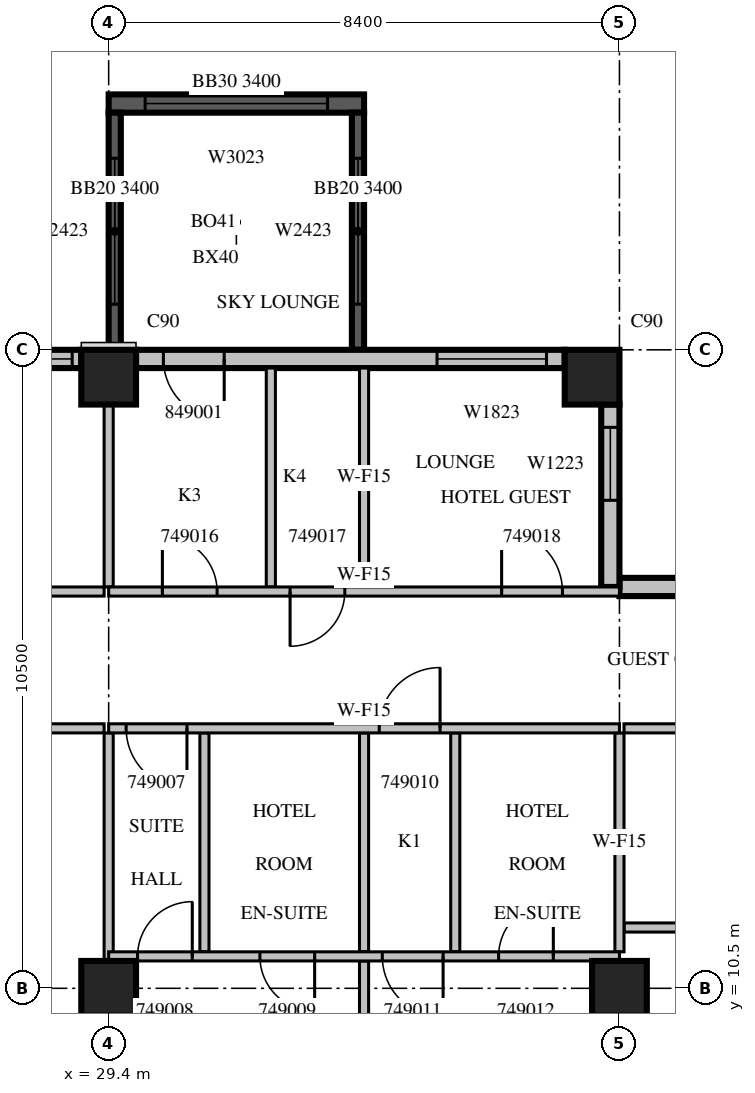
"""IFC4 building model, lengths in metres.
Left out: names, types, materials, properties, quantities, classifications, styles, units other than length and angle.
Written with IfcOpenShell. Run it as: python <this file> out.ifc"""

import sys

from ifc_helpers import new_model, si_unit, direction, frame, frame_2d, origin, origin_2d, place, context, subcontext, project, spatial, rectangle, extrude, source, transform, mapped, element, fill, save


model = new_model("IFC4")
c1 = context("Model", 3, precision=1e-05, world=origin(), true_north=direction((0.0, 1.0)))
c2 = subcontext(c1, "Body", "Model", "MODEL_VIEW")
j1 = project(units=[si_unit("LENGTHUNIT", "METRE"), si_unit("PLANEANGLEUNIT", "RADIAN")], contexts=[c1])
p1 = place(None, origin())
s1 = spatial("IfcSite", under=j1, at=p1, CompositionType="ELEMENT")
p2 = place(p1, origin())
s2 = spatial("IfcBuilding", under=s1, at=p2, CompositionType="ELEMENT")
p3 = place(p2, frame((0.0, 0.0, 219.6)))
s3 = spatial("IfcBuildingStorey", under=s2, at=p3, CompositionType="ELEMENT", Elevation=219.6)
m1 = source(origin(), c2, "Body", "SweptSolid", [
    extrude(rectangle(XDim=0.9, YDim=0.9, at=origin_2d()), origin(), (0.0, 0.0, 1.0), 3.8),
])
for number, where, z_axis, x_axis in (
    (1, (29.4, 10.5, 0.0), (0.0, 0.0, 1.0), (1.0, 0.0, 0.0)),
    (2, (37.8, 10.5, 0.0), (0.0, 0.0, 1.0), (1.0, 0.0, 0.0)),
    (3, (29.4, 20.55, 0.0), (0.0, 0.0, 1.0), (1.0, 0.0, 0.0)),
    (4, (37.35, 20.55, 0.0), (0.0, 0.0, 1.0), (1.0, 0.0, 0.0)),
):
    element("IfcColumn", number, at=place(p3, frame(where, z_axis=z_axis, x_axis=x_axis)), inside=s3, PredefinedType="COLUMN", context=c2, shape_type="MappedRepresentation", body=[
        mapped(m1, transform((0.0, 0.0, 0.0), scale=1.0)),
    ])
m2 = source(origin(), c2, "Body", "SweptSolid", [
    extrude(rectangle(XDim=4.2, YDim=0.3, at=frame_2d((2.1, 0.0))), origin(), (0.0, 0.0, 1.0), 3.4),
])
p4 = place(p3, frame((33.6, 25.05, 0.0), z_axis=(0.0, 0.0, 1.0), x_axis=(-1.0, 0.0, 0.0)))
e5 = element("IfcWall", 5, at=p4, inside=s3, PredefinedType="SOLIDWALL", context=c2, shape_type="MappedRepresentation", body=[
    mapped(m2, transform((0.0, 0.0, 0.0), scale=1.0)),
])
m3 = source(origin(), c2, "Body", "SweptSolid", [
    extrude(rectangle(XDim=3.0, YDim=2.3, at=frame_2d((1.5, 1.15))), frame((0.0, 0.16, 0.0), z_axis=(0.0, -1.0, 0.0), x_axis=(1.0, 0.0, 0.0)), (0.0, 0.0, 1.0), 0.32),
])
p5 = place(p4, frame((0.6, 0.0, 0.6)))
e6 = element("IfcOpeningElement", 6, at=p5, cuts=e5, PredefinedType="OPENING", context=c2, shape_type="MappedRepresentation", body=[
    mapped(m3, transform((0.0, 0.0, 0.0), scale=1.0)),
])
m4 = source(origin(), c2, "Body", "SweptSolid", [
    extrude(rectangle(XDim=3.9, YDim=0.2, at=frame_2d((1.95, 0.0))), origin(), (0.0, 0.0, 1.0), 3.4),
])
p6 = place(p3, frame((33.5, 21.0, 0.0), z_axis=(0.0, 0.0, 1.0), x_axis=(0.0, 1.0, 0.0)))
e7 = element("IfcWall", 7, at=p6, inside=s3, PredefinedType="SOLIDWALL", context=c2, shape_type="MappedRepresentation", body=[
    mapped(m4, transform((0.0, 0.0, 0.0), scale=1.0)),
])
m5 = source(origin(), c2, "Body", "SweptSolid", [
    extrude(rectangle(XDim=2.4, YDim=2.3, at=frame_2d((1.2, 1.15))), frame((0.0, 0.11, 0.0), z_axis=(0.0, -1.0, 0.0), x_axis=(1.0, 0.0, 0.0)), (0.0, 0.0, 1.0), 0.22),
])
p7 = place(p6, frame((0.75, 0.0, 0.6)))
e8 = element("IfcOpeningElement", 8, at=p7, cuts=e7, PredefinedType="OPENING", context=c2, shape_type="MappedRepresentation", body=[
    mapped(m5, transform((0.0, 0.0, 0.0), scale=1.0)),
])
p8 = place(p3, frame((29.5, 21.0, 0.0), z_axis=(0.0, 0.0, 1.0), x_axis=(0.0, 1.0, 0.0)))
e9 = element("IfcWall", 9, at=p8, inside=s3, PredefinedType="SOLIDWALL", context=c2, shape_type="MappedRepresentation", body=[
    mapped(m4, transform((0.0, 0.0, 0.0), scale=1.0)),
])
p9 = place(p8, frame((0.75, 0.0, 0.6)))
e10 = element("IfcOpeningElement", 10, at=p9, cuts=e9, PredefinedType="OPENING", context=c2, shape_type="MappedRepresentation", body=[
    mapped(m5, transform((0.0, 0.0, 0.0), scale=1.0)),
])
m6 = source(origin(), c2, "Body", "SweptSolid", [
    extrude(rectangle(XDim=15.96, YDim=0.3, at=frame_2d((7.98, 0.0))), origin(), (0.0, 0.0, 1.0), 3.4),
])
p10 = place(p3, frame((53.76, 17.1, 0.0), z_axis=(0.0, 0.0, 1.0), x_axis=(-1.0, 0.0, 0.0)))
e11 = element("IfcWall", 11, at=p10, inside=s3, PredefinedType="STANDARD", context=c2, shape_type="MappedRepresentation", body=[
    mapped(m6, transform((0.0, 0.0, 0.0), scale=1.0)),
])
p11 = place(p10, frame((0.6, 0.0, 0.6)))
e12 = element("IfcOpeningElement", 12, at=p11, cuts=e11, PredefinedType="OPENING", context=c2, shape_type="MappedRepresentation", body=[
    mapped(m3, transform((0.0, 0.0, 0.0), scale=1.0)),
])
p12 = place(p10, frame((4.8, 0.0, 0.6)))
e13 = element("IfcOpeningElement", 13, at=p12, cuts=e11, PredefinedType="OPENING", context=c2, shape_type="MappedRepresentation", body=[
    mapped(m3, transform((0.0, 0.0, 0.0), scale=1.0)),
])
m7 = source(origin(), c2, "Body", "SweptSolid", [
    extrude(rectangle(XDim=3.6, YDim=2.3, at=frame_2d((1.8, 1.15))), frame((0.0, 0.16, 0.0), z_axis=(0.0, -1.0, 0.0), x_axis=(1.0, 0.0, 0.0)), (0.0, 0.0, 1.0), 0.32),
])
p13 = place(p10, frame((9.54, 0.0, 0.6)))
e14 = element("IfcOpeningElement", 14, at=p13, cuts=e11, PredefinedType="OPENING", context=c2, shape_type="MappedRepresentation", body=[
    mapped(m7, transform((0.0, 0.0, 0.0), scale=1.0)),
])
m8 = source(origin(), c2, "Body", "SweptSolid", [
    extrude(rectangle(XDim=3.0, YDim=0.3, at=frame_2d((1.5, 0.0))), origin(), (0.0, 0.0, 1.0), 3.4),
])
p14 = place(p3, frame((37.65, 17.1, 0.0), z_axis=(0.0, 0.0, 1.0), x_axis=(0.0, 1.0, 0.0)))
e15 = element("IfcWall", 15, at=p14, inside=s3, PredefinedType="STANDARD", context=c2, shape_type="MappedRepresentation", body=[
    mapped(m8, transform((0.0, 0.0, 0.0), scale=1.0)),
])
m9 = source(origin(), c2, "Body", "SweptSolid", [
    extrude(rectangle(XDim=1.2, YDim=2.3, at=frame_2d((0.6, 1.15))), frame((0.0, 0.16, 0.0), z_axis=(0.0, -1.0, 0.0), x_axis=(1.0, 0.0, 0.0)), (0.0, 0.0, 1.0), 0.32),
])
p15 = place(p14, frame((1.425, 0.0, 0.6)))
e16 = element("IfcOpeningElement", 16, at=p15, cuts=e15, PredefinedType="OPENING", context=c2, shape_type="MappedRepresentation", body=[
    mapped(m9, transform((0.0, 0.0, 0.0), scale=1.0)),
])
m10 = source(origin(), c2, "Body", "SweptSolid", [
    extrude(rectangle(XDim=7.05, YDim=0.3, at=frame_2d((3.525, 0.0))), origin(), (0.0, 0.0, 1.0), 3.4),
])
p16 = place(p3, frame((36.9, 20.85, 0.0), z_axis=(0.0, 0.0, 1.0), x_axis=(-1.0, 0.0, 0.0)))
e17 = element("IfcWall", 17, at=p16, inside=s3, PredefinedType="STANDARD", context=c2, shape_type="MappedRepresentation", body=[
    mapped(m10, transform((0.0, 0.0, 0.0), scale=1.0)),
])
m11 = source(origin(), c2, "Body", "SweptSolid", [
    extrude(rectangle(XDim=1.8, YDim=2.3, at=frame_2d((0.9, 1.15))), frame((0.0, 0.16, 0.0), z_axis=(0.0, -1.0, 0.0), x_axis=(1.0, 0.0, 0.0)), (0.0, 0.0, 1.0), 0.32),
])
p17 = place(p16, frame((0.3, 0.0, 0.6)))
e18 = element("IfcOpeningElement", 18, at=p17, cuts=e17, PredefinedType="OPENING", context=c2, shape_type="MappedRepresentation", body=[
    mapped(m11, transform((0.0, 0.0, 0.0), scale=1.0)),
])
m12 = source(origin(), c2, "Body", "SweptSolid", [
    extrude(rectangle(XDim=1.0, YDim=2.1, at=frame_2d((0.5, 1.05))), frame((0.0, 0.16, 0.0), z_axis=(0.0, -1.0, 0.0), x_axis=(1.0, 0.0, 0.0)), (0.0, 0.0, 1.0), 0.32),
])
p18 = place(p16, frame((5.6, 0.0, 0.0)))
e19 = element("IfcOpeningElement", 19, at=p18, cuts=e17, PredefinedType="OPENING", context=c2, shape_type="MappedRepresentation", body=[
    mapped(m12, transform((0.0, 0.0, 0.0), scale=1.0)),
])
m13 = source(origin(), c2, "Body", "SweptSolid", [
    extrude(rectangle(XDim=7.15, YDim=0.3, at=frame_2d((3.575, 0.0))), origin(), (0.0, 0.0, 1.0), 3.4),
])
p19 = place(p3, frame((28.95, 20.85, 0.0), z_axis=(0.0, 0.0, 1.0), x_axis=(-1.0, 0.0, 0.0)))
e20 = element("IfcWall", 20, at=p19, inside=s3, PredefinedType="STANDARD", context=c2, shape_type="MappedRepresentation", body=[
    mapped(m13, transform((0.0, 0.0, 0.0), scale=1.0)),
])
p20 = place(p19, frame((0.15, 0.0, 0.6)))
e21 = element("IfcOpeningElement", 21, at=p20, cuts=e20, PredefinedType="OPENING", context=c2, shape_type="MappedRepresentation", body=[
    mapped(m3, transform((0.0, 0.0, 0.0), scale=1.0)),
])
p21 = place(p19, frame((4.95, 0.0, 0.6)))
e22 = element("IfcOpeningElement", 22, at=p21, cuts=e20, PredefinedType="OPENING", context=c2, shape_type="MappedRepresentation", body=[
    mapped(m11, transform((0.0, 0.0, 0.0), scale=1.0)),
])
m14 = source(origin(), c2, "Body", "SweptSolid", [
    extrude(rectangle(XDim=4.85, YDim=0.15, at=frame_2d((2.425, 0.0))), origin(), (0.0, 0.0, 1.0), 3.4),
])
for number, where, z_axis, x_axis in (
    (23, (29.325, 14.775, 0.0), (0.0, 0.0, 1.0), (-1.0, 0.0, 0.0)),
    (24, (24.475, 17.025, 0.0), (0.0, 0.0, 1.0), (1.0, 0.0, 0.0)),
):
    element("IfcWall", number, at=place(p3, frame(where, z_axis=z_axis, x_axis=x_axis)), inside=s3, PredefinedType="PARTITIONING", context=c2, shape_type="MappedRepresentation", body=[
        mapped(m14, transform((0.0, 0.0, 0.0), scale=1.0)),
    ])
m15 = source(origin(), c2, "Body", "SweptSolid", [
    extrude(rectangle(XDim=3.751, YDim=0.15, at=frame_2d((1.875, 0.0))), origin(), (0.0, 0.0, 1.0), 3.4),
])
p22 = place(p3, frame((29.4, 10.949, 0.0), z_axis=(0.0, 0.0, 1.0), x_axis=(0.0, 1.0, 0.0)))
e25 = element("IfcWall", 25, at=p22, inside=s3, PredefinedType="PARTITIONING", context=c2, shape_type="MappedRepresentation", body=[
    mapped(m15, transform((0.0, 0.0, 0.0), scale=1.0)),
])
m16 = source(origin(), c2, "Body", "SweptSolid", [
    extrude(rectangle(XDim=3.001, YDim=0.15, at=frame_2d((1.5, 0.0))), origin(), (0.0, 0.0, 1.0), 3.4),
])
p23 = place(p3, frame((29.4, 17.1, 0.0), z_axis=(0.0, 0.0, 1.0), x_axis=(0.0, 1.0, 0.0)))
e26 = element("IfcWall", 26, at=p23, inside=s3, PredefinedType="PARTITIONING", context=c2, shape_type="MappedRepresentation", body=[
    mapped(m16, transform((0.0, 0.0, 0.0), scale=1.0)),
])
m17 = source(origin(), c2, "Body", "SweptSolid", [
    extrude(rectangle(XDim=6.45, YDim=0.15, at=frame_2d((3.225, 0.0))), origin(), (0.0, 0.0, 1.0), 3.4),
])
p24 = place(p3, frame((37.875, 11.5, 0.0), z_axis=(0.0, 0.0, 1.0), x_axis=(1.0, 0.0, 0.0)))
e27 = element("IfcWall", 27, at=p24, inside=s3, PredefinedType="PARTITIONING", context=c2, shape_type="MappedRepresentation", body=[
    mapped(m17, transform((0.0, 0.0, 0.0), scale=1.0)),
])
p25 = place(p3, frame((44.325, 14.775, 0.0), z_axis=(0.0, 0.0, 1.0), x_axis=(-1.0, 0.0, 0.0)))
e28 = element("IfcWall", 28, at=p25, inside=s3, PredefinedType="PARTITIONING", context=c2, shape_type="MappedRepresentation", body=[
    mapped(m17, transform((0.0, 0.0, 0.0), scale=1.0)),
])
m18 = source(origin(), c2, "Body", "SweptSolid", [
    extrude(rectangle(XDim=0.9, YDim=2.1, at=frame_2d((0.45, 1.05))), frame((0.0, 0.085, 0.0), z_axis=(0.0, -1.0, 0.0), x_axis=(1.0, 0.0, 0.0)), (0.0, 0.0, 1.0), 0.17),
])
p26 = place(p25, frame((2.812, 0.0, 0.0)))
e29 = element("IfcOpeningElement", 29, at=p26, cuts=e28, PredefinedType="OPENING", context=c2, shape_type="MappedRepresentation", body=[
    mapped(m18, transform((0.0, 0.0, 0.0), scale=1.0)),
])
m19 = source(origin(), c2, "Body", "SweptSolid", [
    extrude(rectangle(XDim=10.65, YDim=0.15, at=frame_2d((5.325, 0.0))), origin(), (0.0, 0.0, 1.0), 3.4),
])
p27 = place(p3, frame((33.6, 0.3, 0.0), z_axis=(0.0, 0.0, 1.0), x_axis=(0.0, 1.0, 0.0)))
e30 = element("IfcWall", 30, at=p27, inside=s3, PredefinedType="PARTITIONING", context=c2, shape_type="MappedRepresentation", body=[
    mapped(m19, transform((0.0, 0.0, 0.0), scale=1.0)),
])
m20 = source(origin(), c2, "Body", "SweptSolid", [
    extrude(rectangle(XDim=3.6, YDim=0.15, at=frame_2d((1.8, 0.0))), origin(), (0.0, 0.0, 1.0), 3.4),
])
for number, where, z_axis, x_axis in (
    (31, (30.975, 11.1, 0.0), (0.0, 0.0, 1.0), (0.0, 1.0, 0.0)),
    (32, (33.6, 11.1, 0.0), (0.0, 0.0, 1.0), (0.0, 1.0, 0.0)),
    (33, (35.1, 11.1, 0.0), (0.0, 0.0, 1.0), (0.0, 1.0, 0.0)),
    (34, (37.8, 11.1, 0.0), (0.0, 0.0, 1.0), (0.0, 1.0, 0.0)),
):
    element("IfcWall", number, at=place(p3, frame(where, z_axis=z_axis, x_axis=x_axis)), inside=s3, PredefinedType="PARTITIONING", context=c2, shape_type="MappedRepresentation", body=[
        mapped(m20, transform((0.0, 0.0, 0.0), scale=1.0)),
    ])
m21 = source(origin(), c2, "Body", "SweptSolid", [
    extrude(rectangle(XDim=8.4, YDim=0.15, at=frame_2d((4.2, 0.0))), origin(), (0.0, 0.0, 1.0), 3.4),
])
p28 = place(p3, frame((37.8, 11.025, 0.0), z_axis=(0.0, 0.0, 1.0), x_axis=(-1.0, 0.0, 0.0)))
e35 = element("IfcWall", 35, at=p28, inside=s3, PredefinedType="PARTITIONING", context=c2, shape_type="MappedRepresentation", body=[
    mapped(m21, transform((0.0, 0.0, 0.0), scale=1.0)),
])
p29 = place(p28, frame((7.025, 0.0, 0.0)))
e36 = element("IfcOpeningElement", 36, at=p29, cuts=e35, PredefinedType="OPENING", context=c2, shape_type="MappedRepresentation", body=[
    mapped(m18, transform((0.0, 0.0, 0.0), scale=1.0)),
])
p30 = place(p28, frame((5.013, 0.0, 0.0)))
e37 = element("IfcOpeningElement", 37, at=p30, cuts=e35, PredefinedType="OPENING", context=c2, shape_type="MappedRepresentation", body=[
    mapped(m18, transform((0.0, 0.0, 0.0), scale=1.0)),
])
m22 = source(origin(), c2, "Body", "SweptSolid", [
    extrude(rectangle(XDim=1.0, YDim=2.1, at=frame_2d((0.5, 1.05))), frame((0.0, 0.085, 0.0), z_axis=(0.0, -1.0, 0.0), x_axis=(1.0, 0.0, 0.0)), (0.0, 0.0, 1.0), 0.17),
])
p31 = place(p28, frame((2.9, 0.0, 0.0)))
e38 = element("IfcOpeningElement", 38, at=p31, cuts=e35, PredefinedType="OPENING", context=c2, shape_type="MappedRepresentation", body=[
    mapped(m22, transform((0.0, 0.0, 0.0), scale=1.0)),
])
p32 = place(p28, frame((1.087, 0.0, 0.0)))
e39 = element("IfcOpeningElement", 39, at=p32, cuts=e35, PredefinedType="OPENING", context=c2, shape_type="MappedRepresentation", body=[
    mapped(m18, transform((0.0, 0.0, 0.0), scale=1.0)),
])
for number, where, z_axis, x_axis in (
    (40, (32.067, 20.7, 0.0), (0.0, 0.0, 1.0), (0.0, -1.0, 0.0)),
    (41, (33.6, 17.1, 0.0), (0.0, 0.0, 1.0), (0.0, 1.0, 0.0)),
):
    element("IfcWall", number, at=place(p3, frame(where, z_axis=z_axis, x_axis=x_axis)), inside=s3, PredefinedType="PARTITIONING", context=c2, shape_type="MappedRepresentation", body=[
        mapped(m20, transform((0.0, 0.0, 0.0), scale=1.0)),
    ])
p33 = place(p3, frame((37.8, 14.775, 0.0), z_axis=(0.0, 0.0, 1.0), x_axis=(-1.0, 0.0, 0.0)))
e42 = element("IfcWall", 42, at=p33, inside=s3, PredefinedType="PARTITIONING", context=c2, shape_type="MappedRepresentation", body=[
    mapped(m21, transform((0.0, 0.0, 0.0), scale=1.0)),
])
p34 = place(p33, frame((7.112, 0.0, 0.0)))
e43 = element("IfcOpeningElement", 43, at=p34, cuts=e42, PredefinedType="OPENING", context=c2, shape_type="MappedRepresentation", body=[
    mapped(m22, transform((0.0, 0.0, 0.0), scale=1.0)),
])
p35 = place(p33, frame((2.95, 0.0, 0.0)))
e44 = element("IfcOpeningElement", 44, at=p35, cuts=e42, PredefinedType="OPENING", context=c2, shape_type="MappedRepresentation", body=[
    mapped(m22, transform((0.0, 0.0, 0.0), scale=1.0)),
])
p36 = place(p3, frame((29.4, 17.025, 0.0), z_axis=(0.0, 0.0, 1.0), x_axis=(1.0, 0.0, 0.0)))
e45 = element("IfcWall", 45, at=p36, inside=s3, PredefinedType="PARTITIONING", context=c2, shape_type="MappedRepresentation", body=[
    mapped(m21, transform((0.0, 0.0, 0.0), scale=1.0)),
])
p37 = place(p36, frame((0.883, 0.0, 0.0)))
e46 = element("IfcOpeningElement", 46, at=p37, cuts=e45, PredefinedType="OPENING", context=c2, shape_type="MappedRepresentation", body=[
    mapped(m18, transform((0.0, 0.0, 0.0), scale=1.0)),
])
p38 = place(p36, frame((2.983, 0.0, 0.0)))
e47 = element("IfcOpeningElement", 47, at=p38, cuts=e45, PredefinedType="OPENING", context=c2, shape_type="MappedRepresentation", body=[
    mapped(m18, transform((0.0, 0.0, 0.0), scale=1.0)),
])
p39 = place(p36, frame((6.463, 0.0, 0.0)))
e48 = element("IfcOpeningElement", 48, at=p39, cuts=e45, PredefinedType="OPENING", context=c2, shape_type="MappedRepresentation", body=[
    mapped(m22, transform((0.0, 0.0, 0.0), scale=1.0)),
])
m23 = source(origin(), c2, "Body", "SweptSolid", [
    extrude(rectangle(XDim=3.0, YDim=2.3, at=frame_2d((1.5, 1.15))), frame((0.0, 0.03, 0.0), z_axis=(0.0, -1.0, 0.0), x_axis=(1.0, 0.0, 0.0)), (0.0, 0.0, 1.0), 0.06),
])
p40 = place(p5, origin())
e49 = element("IfcWindow", 49, at=p40, inside=s3, PartitioningType="SINGLE_PANEL", PredefinedType="WINDOW", context=c2, shape_type="MappedRepresentation", body=[
    mapped(m23, transform((0.0, 0.0, 0.0), scale=1.0)),
])
fill(e6, e49)
m24 = source(origin(), c2, "Body", "SweptSolid", [
    extrude(rectangle(XDim=2.4, YDim=2.3, at=frame_2d((1.2, 1.15))), frame((0.0, 0.03, 0.0), z_axis=(0.0, -1.0, 0.0), x_axis=(1.0, 0.0, 0.0)), (0.0, 0.0, 1.0), 0.06),
])
p41 = place(p7, origin())
e50 = element("IfcWindow", 50, at=p41, inside=s3, PartitioningType="SINGLE_PANEL", PredefinedType="WINDOW", context=c2, shape_type="MappedRepresentation", body=[
    mapped(m24, transform((0.0, 0.0, 0.0), scale=1.0)),
])
fill(e8, e50)
p42 = place(p9, origin())
e51 = element("IfcWindow", 51, at=p42, inside=s3, PartitioningType="SINGLE_PANEL", PredefinedType="WINDOW", context=c2, shape_type="MappedRepresentation", body=[
    mapped(m24, transform((0.0, 0.0, 0.0), scale=1.0)),
])
fill(e10, e51)
m25 = source(origin(), c2, "Body", "SweptSolid", [
    extrude(rectangle(XDim=1.2, YDim=2.3, at=frame_2d((0.6, 1.15))), frame((0.0, 0.03, 0.0), z_axis=(0.0, -1.0, 0.0), x_axis=(1.0, 0.0, 0.0)), (0.0, 0.0, 1.0), 0.06),
])
p43 = place(p15, origin())
e52 = element("IfcWindow", 52, at=p43, inside=s3, PartitioningType="SINGLE_PANEL", PredefinedType="WINDOW", context=c2, shape_type="MappedRepresentation", body=[
    mapped(m25, transform((0.0, 0.0, 0.0), scale=1.0)),
])
fill(e16, e52)
m26 = source(origin(), c2, "Body", "SweptSolid", [
    extrude(rectangle(XDim=1.8, YDim=2.3, at=frame_2d((0.9, 1.15))), frame((0.0, 0.03, 0.0), z_axis=(0.0, -1.0, 0.0), x_axis=(1.0, 0.0, 0.0)), (0.0, 0.0, 1.0), 0.06),
])
p44 = place(p17, origin())
e53 = element("IfcWindow", 53, at=p44, inside=s3, PartitioningType="SINGLE_PANEL", PredefinedType="WINDOW", context=c2, shape_type="MappedRepresentation", body=[
    mapped(m26, transform((0.0, 0.0, 0.0), scale=1.0)),
])
fill(e18, e53)
p45 = place(p20, origin())
e54 = element("IfcWindow", 54, at=p45, inside=s3, PartitioningType="SINGLE_PANEL", PredefinedType="WINDOW", context=c2, shape_type="MappedRepresentation", body=[
    mapped(m23, transform((0.0, 0.0, 0.0), scale=1.0)),
])
fill(e21, e54)
m27 = source(origin(), c2, "Body", "SweptSolid", [
    extrude(rectangle(XDim=1.0, YDim=2.1, at=frame_2d((0.5, 1.05))), frame((0.0, 0.025, 0.0), z_axis=(0.0, -1.0, 0.0), x_axis=(1.0, 0.0, 0.0)), (0.0, 0.0, 1.0), 0.05),
])
p46 = place(p34, origin())
e55 = element("IfcDoor", 55, at=p46, inside=s3, OperationType="SINGLE_SWING_LEFT", PredefinedType="DOOR", context=c2, shape_type="MappedRepresentation", body=[
    mapped(m27, transform((0.0, 0.0, 0.0), scale=1.0)),
])
fill(e43, e55)
m28 = source(origin(), c2, "Body", "SweptSolid", [
    extrude(rectangle(XDim=0.9, YDim=2.1, at=frame_2d((0.45, 1.05))), frame((0.0, 0.025, 0.0), z_axis=(0.0, -1.0, 0.0), x_axis=(1.0, 0.0, 0.0)), (0.0, 0.0, 1.0), 0.05),
])
p47 = place(p29, origin())
e56 = element("IfcDoor", 56, at=p47, inside=s3, OperationType="SINGLE_SWING_RIGHT", PredefinedType="DOOR", context=c2, shape_type="MappedRepresentation", body=[
    mapped(m28, transform((0.0, 0.0, 0.0), scale=1.0)),
])
fill(e36, e56)
p48 = place(p30, origin())
e57 = element("IfcDoor", 57, at=p48, inside=s3, OperationType="SINGLE_SWING_LEFT", PredefinedType="DOOR", context=c2, shape_type="MappedRepresentation", body=[
    mapped(m28, transform((0.0, 0.0, 0.0), scale=1.0)),
])
fill(e37, e57)
p49 = place(p35, origin())
e58 = element("IfcDoor", 58, at=p49, inside=s3, OperationType="SINGLE_SWING_RIGHT", PredefinedType="DOOR", context=c2, shape_type="MappedRepresentation", body=[
    mapped(m27, transform((0.0, 0.0, 0.0), scale=1.0)),
])
fill(e44, e58)
p50 = place(p31, origin())
e59 = element("IfcDoor", 59, at=p50, inside=s3, OperationType="SINGLE_SWING_LEFT", PredefinedType="DOOR", context=c2, shape_type="MappedRepresentation", body=[
    mapped(m27, transform((0.0, 0.0, 0.0), scale=1.0)),
])
fill(e38, e59)
p51 = place(p32, origin())
e60 = element("IfcDoor", 60, at=p51, inside=s3, OperationType="SINGLE_SWING_RIGHT", PredefinedType="DOOR", context=c2, shape_type="MappedRepresentation", body=[
    mapped(m28, transform((0.0, 0.0, 0.0), scale=1.0)),
])
fill(e39, e60)
p52 = place(p37, origin())
e61 = element("IfcDoor", 61, at=p52, inside=s3, OperationType="SINGLE_SWING_LEFT", PredefinedType="DOOR", context=c2, shape_type="MappedRepresentation", body=[
    mapped(m28, transform((0.0, 0.0, 0.0), scale=1.0)),
])
fill(e46, e61)
p53 = place(p38, origin())
e62 = element("IfcDoor", 62, at=p53, inside=s3, OperationType="SINGLE_SWING_RIGHT", PredefinedType="DOOR", context=c2, shape_type="MappedRepresentation", body=[
    mapped(m28, transform((0.0, 0.0, 0.0), scale=1.0)),
])
fill(e47, e62)
p54 = place(p39, origin())
e63 = element("IfcDoor", 63, at=p54, inside=s3, OperationType="SINGLE_SWING_LEFT", PredefinedType="DOOR", context=c2, shape_type="MappedRepresentation", body=[
    mapped(m27, transform((0.0, 0.0, 0.0), scale=1.0)),
])
fill(e48, e63)
p55 = place(p18, origin())
e64 = element("IfcDoor", 64, at=p55, inside=s3, OperationType="SINGLE_SWING_LEFT", PredefinedType="DOOR", context=c2, shape_type="MappedRepresentation", body=[
    mapped(m27, transform((0.0, 0.0, 0.0), scale=1.0)),
])
fill(e19, e64)
save(model, sys.argv[1])
